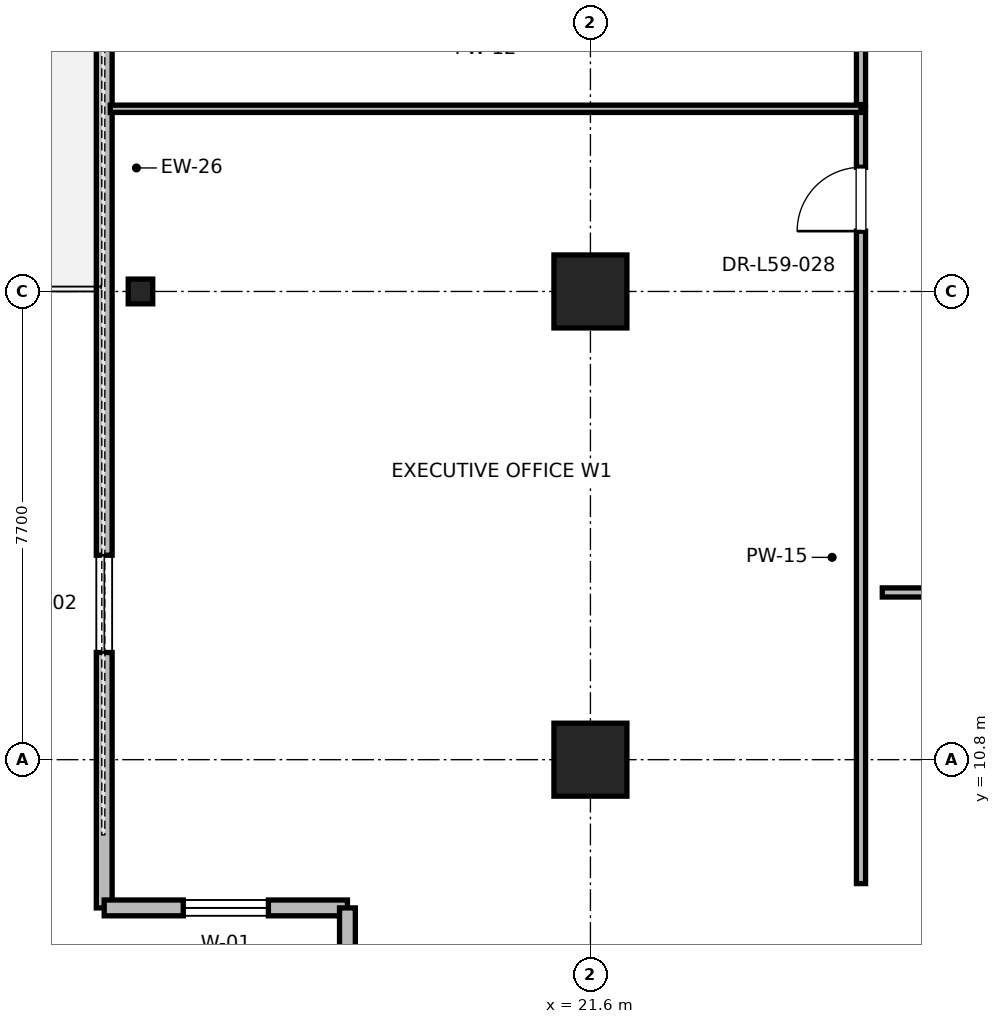
"""IFC4 building model, lengths in metres.
Left out: names, types, materials, properties, quantities, classifications, styles, units other than length and angle.
Written with IfcOpenShell. Run it as: python <this file> out.ifc"""

import sys

from ifc_helpers import new_model, si_unit, direction, frame, frame_2d, origin, origin_2d, place, context, subcontext, project, spatial, rectangle, i_section, extrude, element, fill, save


model = new_model("IFC4")
c1 = context("Model", 3, precision=1e-05, world=origin(), true_north=direction((0.0, 1.0)))
c2 = subcontext(c1, "Body", "Model", "MODEL_VIEW")
j1 = project(units=[si_unit("LENGTHUNIT", "METRE"), si_unit("PLANEANGLEUNIT", "RADIAN")], contexts=[c1])
p1 = place(None, origin())
s1 = spatial("IfcSite", under=j1, at=p1, CompositionType="ELEMENT")
p2 = place(p1, origin())
s2 = spatial("IfcBuilding", under=s1, at=p2, CompositionType="ELEMENT")
p3 = place(p2, frame((0.0, 0.0, 255.2)))
s3 = spatial("IfcBuildingStorey", under=s2, at=p3, CompositionType="ELEMENT", Elevation=255.2)
for number, where, z_axis, x_axis in (
    (1, (21.6, 18.5, 0.0), (0.0, 0.0, 1.0), (1.0, 0.0, 0.0)),
    (2, (21.6, 10.8, 0.0), (0.0, 0.0, 1.0), (1.0, 0.0, 0.0)),
):
    element("IfcColumn", number, at=place(p3, frame(where, z_axis=z_axis, x_axis=x_axis)), inside=s3, PredefinedType="COLUMN", context=c2, shape_type="SweptSolid", body=[
        extrude(rectangle(XDim=1.2, YDim=1.2, at=origin_2d()), origin(), (0.0, 0.0, 1.0), 4.0),
    ])
p4 = place(p3, frame((14.2, 18.5, 0.0), z_axis=(0.0, 0.0, 1.0), x_axis=(1.0, 0.0, 0.0)))
e3 = element("IfcColumn", 3, at=p4, inside=s3, PredefinedType="COLUMN", context=c2, shape_type="SweptSolid", body=[
    extrude(i_section(OverallWidth=0.403, OverallDepth=0.406, WebThickness=0.027, FlangeThickness=0.043, FilletRadius=0.015, at=origin_2d()), origin(), (0.0, 0.0, 1.0), 4.0),
])
p5 = place(p3, frame((13.604, 46.638, 0.0), z_axis=(0.0, 0.0, 1.0), x_axis=(0.0, -1.0, 0.0)))
e4 = element("IfcWall", 4, at=p5, inside=s3, PredefinedType="PARAPET", context=c2, shape_type="SweptSolid", body=[
    extrude(rectangle(XDim=38.275, YDim=0.26, at=frame_2d((19.138, 0.0))), origin(), (0.0, 0.0, 1.0), 3.785),
])
p6 = place(p5, frame((4.2, 0.0, 0.85)))
e5 = element("IfcOpeningElement", 5, at=p6, cuts=e4, PredefinedType="OPENING", context=c2, shape_type="SweptSolid", body=[
    extrude(rectangle(XDim=1.6, YDim=2.1, at=frame_2d((0.8, 1.05))), frame((0.0, 0.13, 0.0), z_axis=(0.0, -1.0, 0.0), x_axis=(1.0, 0.0, 0.0)), (0.0, 0.0, 1.0), 0.26),
])
p7 = place(p5, frame((18.538, 0.0, 0.0)))
e6 = element("IfcOpeningElement", 6, at=p7, cuts=e4, PredefinedType="OPENING", context=c2, shape_type="SweptSolid", body=[
    extrude(rectangle(XDim=1.2, YDim=2.2, at=frame_2d((0.6, 1.1))), frame((0.0, 0.13, 0.0), z_axis=(0.0, -1.0, 0.0), x_axis=(1.0, 0.0, 0.0)), (0.0, 0.0, 1.0), 0.26),
])
p8 = place(p5, frame((32.475, 0.0, 0.85)))
e7 = element("IfcOpeningElement", 7, at=p8, cuts=e4, PredefinedType="OPENING", context=c2, shape_type="SweptSolid", body=[
    extrude(rectangle(XDim=1.6, YDim=2.1, at=frame_2d((0.8, 1.05))), frame((0.0, 0.13, 0.0), z_axis=(0.0, -1.0, 0.0), x_axis=(1.0, 0.0, 0.0)), (0.0, 0.0, 1.0), 0.26),
])
p9 = place(p3, frame((13.604, 8.362, 0.0), z_axis=(0.0, 0.0, 1.0), x_axis=(1.0, 0.0, 0.0)))
e8 = element("IfcWall", 8, at=p9, inside=s3, PredefinedType="PARAPET", context=c2, shape_type="SweptSolid", body=[
    extrude(rectangle(XDim=4.0, YDim=0.26, at=frame_2d((2.0, 0.0))), origin(), (0.0, 0.0, 1.0), 3.785),
])
p10 = place(p9, frame((1.3, 0.0, 0.85)))
e9 = element("IfcOpeningElement", 9, at=p10, cuts=e8, PredefinedType="OPENING", context=c2, shape_type="SweptSolid", body=[
    extrude(rectangle(XDim=1.4, YDim=2.0, at=frame_2d((0.7, 1.0))), frame((0.0, 0.13, 0.0), z_axis=(0.0, -1.0, 0.0), x_axis=(1.0, 0.0, 0.0)), (0.0, 0.0, 1.0), 0.26),
])
p11 = place(p3, frame((17.604, 8.362, 0.0), z_axis=(0.0, 0.0, 1.0), x_axis=(0.0, -1.0, 0.0)))
e10 = element("IfcWall", 10, at=p11, inside=s3, PredefinedType="PARAPET", context=c2, shape_type="SweptSolid", body=[
    extrude(rectangle(XDim=3.5, YDim=0.26, at=frame_2d((1.75, 0.0))), origin(), (0.0, 0.0, 1.0), 3.785),
])
p12 = place(p3, frame((26.4, 13.55, 0.0), z_axis=(0.0, 0.0, 1.0), x_axis=(1.0, 0.0, 0.0)))
e11 = element("IfcWall", 11, at=p12, inside=s3, PredefinedType="PARTITIONING", context=c2, shape_type="SweptSolid", body=[
    extrude(rectangle(XDim=12.24, YDim=0.15, at=frame_2d((6.12, 0.0))), origin(), (0.0, 0.0, 1.0), 2.85),
])
p13 = place(p12, frame((5.635, 0.0, 0.0)))
e12 = element("IfcOpeningElement", 12, at=p13, cuts=e11, PredefinedType="OPENING", context=c2, shape_type="SweptSolid", body=[
    extrude(rectangle(XDim=1.0, YDim=2.15, at=frame_2d((0.5, 1.075))), frame((0.0, 0.075, 0.0), z_axis=(0.0, -1.0, 0.0), x_axis=(1.0, 0.0, 0.0)), (0.0, 0.0, 1.0), 0.15),
])
p14 = place(p3, frame((26.05, 8.762, 0.0), z_axis=(0.0, 0.0, 1.0), x_axis=(0.0, 1.0, 0.0)))
e13 = element("IfcWall", 13, at=p14, inside=s3, PredefinedType="PARTITIONING", context=c2, shape_type="SweptSolid", body=[
    extrude(rectangle(XDim=12.741, YDim=0.15, at=frame_2d((6.371, 0.0))), origin(), (0.0, 0.0, 1.0), 2.85),
])
p15 = place(p14, frame((10.729, 0.0, 0.0)))
e14 = element("IfcOpeningElement", 14, at=p15, cuts=e13, PredefinedType="OPENING", context=c2, shape_type="SweptSolid", body=[
    extrude(rectangle(XDim=1.05, YDim=2.2, at=frame_2d((0.525, 1.1))), frame((0.0, 0.075, 0.0), z_axis=(0.0, -1.0, 0.0), x_axis=(1.0, 0.0, 0.0)), (0.0, 0.0, 1.0), 0.15),
])
p16 = place(p3, frame((13.704, 21.504, 0.0), z_axis=(0.0, 0.0, 1.0), x_axis=(1.0, 0.0, 0.0)))
e15 = element("IfcWall", 15, at=p16, inside=s3, PredefinedType="PARTITIONING", context=c2, shape_type="SweptSolid", body=[
    extrude(rectangle(XDim=12.346, YDim=0.12, at=frame_2d((6.173, 0.0))), origin(), (0.0, 0.0, 1.0), 2.85),
])
p17 = place(p3, frame((26.05, 21.574, 0.0), z_axis=(0.0, 0.0, 1.0), x_axis=(0.0, 1.0, 0.0)))
e16 = element("IfcWall", 16, at=p17, inside=s3, PredefinedType="PARTITIONING", context=c2, shape_type="SweptSolid", body=[
    extrude(rectangle(XDim=12.672, YDim=0.15, at=frame_2d((6.336, 0.0))), origin(), (0.0, 0.0, 1.0), 2.85),
])
p18 = place(p17, frame((5.551, 0.0, 0.0)))
e17 = element("IfcOpeningElement", 17, at=p18, cuts=e16, PredefinedType="OPENING", context=c2, shape_type="SweptSolid", body=[
    extrude(rectangle(XDim=1.5, YDim=2.25, at=frame_2d((0.75, 1.125))), frame((0.0, 0.075, 0.0), z_axis=(0.0, -1.0, 0.0), x_axis=(1.0, 0.0, 0.0)), (0.0, 0.0, 1.0), 0.15),
])
p19 = place(p8, origin())
e18 = element("IfcWindow", 18, at=p19, inside=s3, PartitioningType="SINGLE_PANEL", PredefinedType="WINDOW", context=c2, shape_type="SweptSolid", body=[
    extrude(rectangle(XDim=1.6, YDim=2.1, at=frame_2d((0.8, 1.05))), frame((0.0, 0.03, 0.0), z_axis=(0.0, -1.0, 0.0), x_axis=(1.0, 0.0, 0.0)), (0.0, 0.0, 1.0), 0.06),
])
fill(e7, e18)
p20 = place(p10, origin())
e19 = element("IfcWindow", 19, at=p20, inside=s3, PartitioningType="SINGLE_PANEL", PredefinedType="WINDOW", context=c2, shape_type="SweptSolid", body=[
    extrude(rectangle(XDim=1.4, YDim=2.0, at=frame_2d((0.7, 1.0))), frame((0.0, 0.03, 0.0), z_axis=(0.0, -1.0, 0.0), x_axis=(1.0, 0.0, 0.0)), (0.0, 0.0, 1.0), 0.06),
])
fill(e9, e19)
p21 = place(p15, origin())
e20 = element("IfcDoor", 20, at=p21, inside=s3, OperationType="SINGLE_SWING_LEFT", PredefinedType="DOOR", context=c2, shape_type="SweptSolid", body=[
    extrude(rectangle(XDim=1.05, YDim=2.2, at=frame_2d((0.525, 1.1))), frame((0.0, 0.025, 0.0), z_axis=(0.0, -1.0, 0.0), x_axis=(1.0, 0.0, 0.0)), (0.0, 0.0, 1.0), 0.05),
])
fill(e14, e20)
save(model, sys.argv[1])
